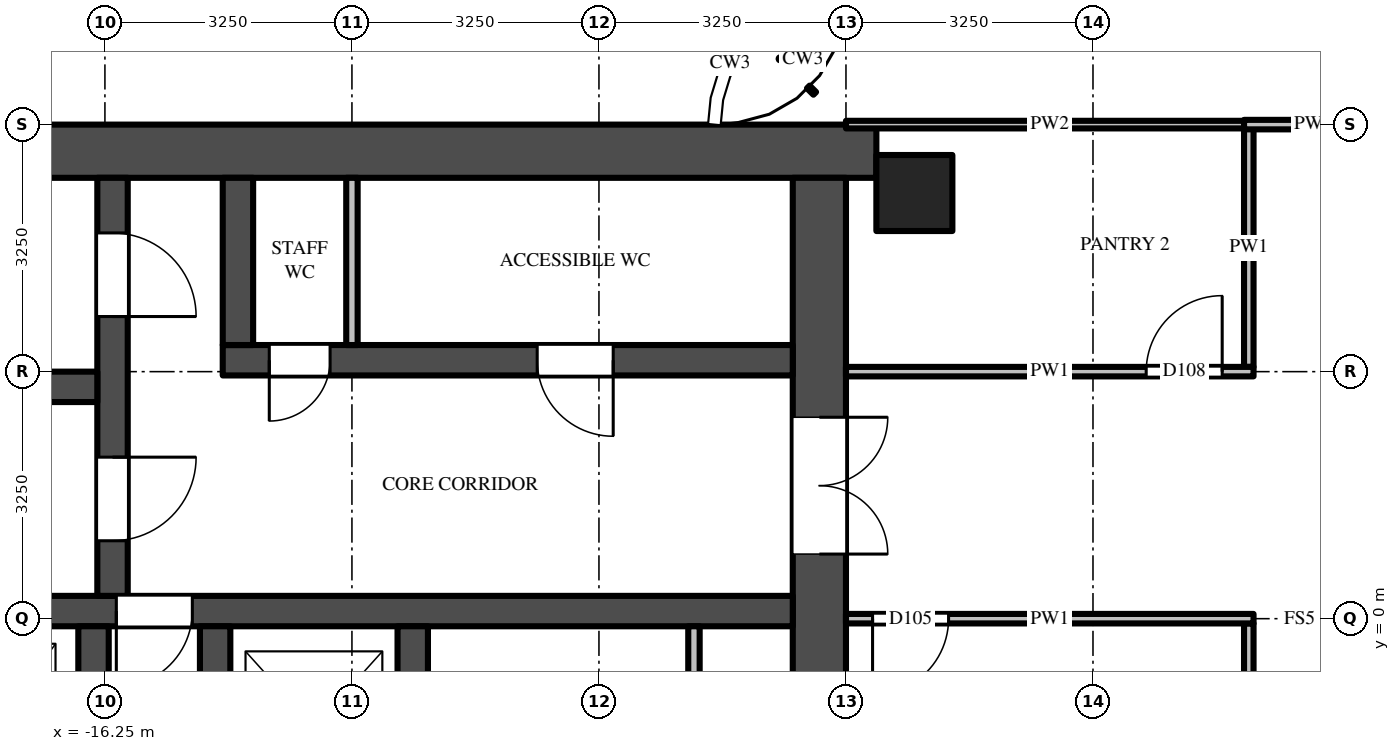
"""IFC4 building model, lengths in metres.
Left out: names, types, materials, properties, quantities, classifications, styles, units other than length and angle.
Written with IfcOpenShell. Run it as: python <this file> out.ifc"""

import sys

from ifc_helpers import new_model, si_unit, direction, frame, frame_2d, origin, origin_2d, place, context, subcontext, project, spatial, rectangle, extrude, source, transform, mapped, element, fill, save


model = new_model("IFC4")
c1 = context("Model", 3, precision=1e-05, world=origin(), true_north=direction((0.0, 1.0)))
c2 = subcontext(c1, "Body", "Model", "MODEL_VIEW")
j1 = project(units=[si_unit("LENGTHUNIT", "METRE"), si_unit("PLANEANGLEUNIT", "RADIAN")], contexts=[c1])
p1 = place(None, origin())
s1 = spatial("IfcSite", under=j1, at=p1, CompositionType="ELEMENT")
p2 = place(p1, origin())
s2 = spatial("IfcBuilding", under=s1, at=p2, CompositionType="ELEMENT")
p3 = place(p2, frame((0.0, 0.0, 287.2)))
s3 = spatial("IfcBuildingStorey", under=s2, at=p3, CompositionType="ELEMENT", Elevation=287.2)
m1 = source(origin(), c2, "Body", "SweptSolid", [
    extrude(rectangle(XDim=1.0, YDim=1.0, at=origin_2d()), origin(), (0.0, 0.0, 1.0), 3.9),
])
p4 = place(p3, frame((-5.6, 5.6, 0.0), z_axis=(0.0, 0.0, 1.0), x_axis=(1.0, 0.0, 0.0)))
e1 = element("IfcColumn", 1, at=p4, inside=s3, PredefinedType="COLUMN", context=c2, shape_type="MappedRepresentation", body=[
    mapped(m1, transform((0.0, 0.0, 0.0))),
])
m2 = source(origin(), c2, "Body", "SweptSolid", [
    extrude(rectangle(XDim=16.65, YDim=0.7, at=frame_2d((8.325, 0.0))), origin(), (0.0, 0.0, 1.0), 3.7),
])
p5 = place(p3, frame((-6.1, 6.15, 0.0), z_axis=(0.0, 0.0, 1.0), x_axis=(-1.0, 0.0, 0.0)))
e2 = element("IfcWall", 2, at=p5, inside=s3, PredefinedType="SHEAR", context=c2, shape_type="MappedRepresentation", body=[
    mapped(m2, transform((0.0, 0.0, 0.0))),
])
m3 = source(origin(), c2, "Body", "SweptSolid", [
    extrude(rectangle(XDim=9.05, YDim=0.7, at=frame_2d((4.525, 0.0))), origin(), (0.0, 0.0, 1.0), 3.7),
])
p6 = place(p3, frame((-6.85, 5.8, 0.0), z_axis=(0.0, 0.0, 1.0), x_axis=(0.0, -1.0, 0.0)))
e3 = element("IfcWall", 3, at=p6, inside=s3, PredefinedType="SHEAR", context=c2, shape_type="MappedRepresentation", body=[
    mapped(m3, transform((0.0, 0.0, 0.0))),
])
m4 = source(origin(), c2, "Body", "SweptSolid", [
    extrude(rectangle(XDim=1.8, YDim=2.1, at=frame_2d((0.9, 1.05))), frame((0.0, 0.36, 0.0), z_axis=(0.0, -1.0, 0.0), x_axis=(1.0, 0.0, 0.0)), (0.0, 0.0, 1.0), 0.72),
])
p7 = place(p6, frame((3.15, 0.0, 0.0)))
e4 = element("IfcOpeningElement", 4, at=p7, cuts=e3, PredefinedType="OPENING", context=c2, shape_type="MappedRepresentation", body=[
    mapped(m4, transform((0.0, 0.0, 0.0))),
])
m5 = source(origin(), c2, "Body", "SweptSolid", [
    extrude(rectangle(XDim=7.5, YDim=0.4, at=frame_2d((3.75, 0.0))), origin(), (0.0, 0.0, 1.0), 3.7),
])
p8 = place(p3, frame((-7.2, 3.4, 0.0), z_axis=(0.0, 0.0, 1.0), x_axis=(-1.0, 0.0, 0.0)))
e5 = element("IfcWall", 5, at=p8, inside=s3, PredefinedType="SHEAR", context=c2, shape_type="MappedRepresentation", body=[
    mapped(m5, transform((0.0, 0.0, 0.0))),
])
m6 = source(origin(), c2, "Body", "SweptSolid", [
    extrude(rectangle(XDim=1.0, YDim=2.1, at=frame_2d((0.5, 1.05))), frame((0.0, 0.21, 0.0), z_axis=(0.0, -1.0, 0.0), x_axis=(1.0, 0.0, 0.0)), (0.0, 0.0, 1.0), 0.42),
])
p9 = place(p8, frame((2.363, 0.0, 0.0)))
e6 = element("IfcOpeningElement", 6, at=p9, cuts=e5, PredefinedType="OPENING", context=c2, shape_type="MappedRepresentation", body=[
    mapped(m6, transform((0.0, 0.0, 0.0))),
])
m7 = source(origin(), c2, "Body", "SweptSolid", [
    extrude(rectangle(XDim=0.8, YDim=2.1, at=frame_2d((0.4, 1.05))), frame((0.0, 0.21, 0.0), z_axis=(0.0, -1.0, 0.0), x_axis=(1.0, 0.0, 0.0)), (0.0, 0.0, 1.0), 0.42),
])
p10 = place(p8, frame((6.087, 0.0, 0.0)))
e7 = element("IfcOpeningElement", 7, at=p10, cuts=e5, PredefinedType="OPENING", context=c2, shape_type="MappedRepresentation", body=[
    mapped(m7, transform((0.0, 0.0, 0.0))),
])
m8 = source(origin(), c2, "Body", "SweptSolid", [
    extrude(rectangle(XDim=14.85, YDim=0.4, at=frame_2d((7.425, 0.0))), origin(), (0.0, 0.0, 1.0), 3.7),
])
p11 = place(p3, frame((-7.2, 0.1, 0.0), z_axis=(0.0, 0.0, 1.0), x_axis=(-1.0, 0.0, 0.0)))
e8 = element("IfcWall", 8, at=p11, inside=s3, PredefinedType="SHEAR", context=c2, shape_type="MappedRepresentation", body=[
    mapped(m8, transform((0.0, 0.0, 0.0))),
])
p12 = place(p11, frame((7.9, 0.0, 0.0)))
e9 = element("IfcOpeningElement", 9, at=p12, cuts=e8, PredefinedType="OPENING", context=c2, shape_type="MappedRepresentation", body=[
    mapped(m6, transform((0.0, 0.0, 0.0))),
])
m9 = source(origin(), c2, "Body", "SweptSolid", [
    extrude(rectangle(XDim=5.5, YDim=0.4, at=frame_2d((2.75, 0.0))), origin(), (0.0, 0.0, 1.0), 3.7),
])
p13 = place(p3, frame((-16.15, 5.8, 0.0), z_axis=(0.0, 0.0, 1.0), x_axis=(0.0, -1.0, 0.0)))
e10 = element("IfcWall", 10, at=p13, inside=s3, PredefinedType="SHEAR", context=c2, shape_type="MappedRepresentation", body=[
    mapped(m9, transform((0.0, 0.0, 0.0))),
])
m10 = source(origin(), c2, "Body", "SweptSolid", [
    extrude(rectangle(XDim=1.1, YDim=2.1, at=frame_2d((0.55, 1.05))), frame((0.0, 0.21, 0.0), z_axis=(0.0, -1.0, 0.0), x_axis=(1.0, 0.0, 0.0)), (0.0, 0.0, 1.0), 0.42),
])
p14 = place(p13, frame((0.725, 0.0, 0.0)))
e11 = element("IfcOpeningElement", 11, at=p14, cuts=e10, PredefinedType="OPENING", context=c2, shape_type="MappedRepresentation", body=[
    mapped(m10, transform((0.0, 0.0, 0.0))),
])
p15 = place(p13, frame((3.675, 0.0, 0.0)))
e12 = element("IfcOpeningElement", 12, at=p15, cuts=e10, PredefinedType="OPENING", context=c2, shape_type="MappedRepresentation", body=[
    mapped(m10, transform((0.0, 0.0, 0.0))),
])
m11 = source(origin(), c2, "Body", "SweptSolid", [
    extrude(rectangle(XDim=5.7, YDim=0.4, at=frame_2d((2.85, 0.0))), origin(), (0.0, 0.0, 1.0), 3.7),
])
p16 = place(p3, frame((-16.35, 3.05, 0.0), z_axis=(0.0, 0.0, 1.0), x_axis=(-1.0, 0.0, 0.0)))
e13 = element("IfcWall", 13, at=p16, inside=s3, PredefinedType="SHEAR", context=c2, shape_type="MappedRepresentation", body=[
    mapped(m11, transform((0.0, 0.0, 0.0))),
])
m12 = source(origin(), c2, "Body", "SweptSolid", [
    extrude(rectangle(XDim=2.2, YDim=0.4, at=frame_2d((1.1, 0.0))), origin(), (0.0, 0.0, 1.0), 3.7),
])
p17 = place(p3, frame((-14.5, 5.8, 0.0), z_axis=(0.0, 0.0, 1.0), x_axis=(0.0, -1.0, 0.0)))
e14 = element("IfcWall", 14, at=p17, inside=s3, PredefinedType="SHEAR", context=c2, shape_type="MappedRepresentation", body=[
    mapped(m12, transform((0.0, 0.0, 0.0))),
])
m13 = source(origin(), c2, "Body", "SweptSolid", [
    extrude(rectangle(XDim=2.45, YDim=0.4, at=frame_2d((1.225, 0.0))), origin(), (0.0, 0.0, 1.0), 3.7),
])
for number, where, z_axis, x_axis in (
    (15, (-12.2, -0.1, 0.0), (0.0, 0.0, 1.0), (0.0, -1.0, 0.0)),
    (16, (-14.8, -0.1, 0.0), (0.0, 0.0, 1.0), (0.0, -1.0, 0.0)),
    (17, (-16.4, -0.1, 0.0), (0.0, 0.0, 1.0), (0.0, -1.0, 0.0)),
):
    element("IfcWall", number, at=place(p3, frame(where, z_axis=z_axis, x_axis=x_axis)), inside=s3, PredefinedType="SHEAR", context=c2, shape_type="MappedRepresentation", body=[
        mapped(m13, transform((0.0, 0.0, 0.0))),
    ])
m14 = source(origin(), c2, "Body", "SweptSolid", [
    extrude(rectangle(XDim=2.2, YDim=0.15, at=frame_2d((1.1, 0.0))), origin(), (0.0, 0.0, 1.0), 3.7),
])
p18 = place(p3, frame((-13.0, 5.8, 0.0), z_axis=(0.0, 0.0, 1.0), x_axis=(0.0, -1.0, 0.0)))
e18 = element("IfcWall", 18, at=p18, inside=s3, PredefinedType="PARTITIONING", context=c2, shape_type="MappedRepresentation", body=[
    mapped(m14, transform((0.0, 0.0, 0.0))),
])
m15 = source(origin(), c2, "Body", "SweptSolid", [
    extrude(rectangle(XDim=2.45, YDim=0.15, at=frame_2d((1.225, 0.0))), origin(), (0.0, 0.0, 1.0), 3.7),
])
p19 = place(p3, frame((-8.5, -0.1, 0.0), z_axis=(0.0, 0.0, 1.0), x_axis=(0.0, -1.0, 0.0)))
e19 = element("IfcWall", 19, at=p19, inside=s3, PredefinedType="PARTITIONING", context=c2, shape_type="MappedRepresentation", body=[
    mapped(m15, transform((0.0, 0.0, 0.0))),
])
m16 = source(origin(), c2, "Body", "SweptSolid", [
    extrude(rectangle(XDim=3.125, YDim=0.125, at=frame_2d((1.562, 0.0))), origin(), (0.0, 0.0, 1.0), 3.068),
])
p20 = place(p3, frame((-1.2, -0.062, 0.0), z_axis=(0.0, 0.0, 1.0), x_axis=(0.0, -1.0, 0.0)))
e20 = element("IfcWall", 20, at=p20, inside=s3, PredefinedType="PARTITIONING", context=c2, shape_type="MappedRepresentation", body=[
    mapped(m16, transform((0.0, 0.0, 0.0))),
])
m17 = source(origin(), c2, "Body", "SweptSolid", [
    extrude(rectangle(XDim=3.137, YDim=0.125, at=frame_2d((1.569, 0.0))), origin(), (0.0, 0.0, 1.0), 2.997),
])
p21 = place(p3, frame((-1.2, 6.45, 0.0), z_axis=(0.0, 0.0, 1.0), x_axis=(0.0, -1.0, 0.0)))
e21 = element("IfcWall", 21, at=p21, inside=s3, PredefinedType="PARTITIONING", context=c2, shape_type="MappedRepresentation", body=[
    mapped(m17, transform((0.0, 0.0, 0.0))),
])
m18 = source(origin(), c2, "Body", "SweptSolid", [
    extrude(rectangle(XDim=5.363, YDim=0.125, at=frame_2d((2.681, 0.0))), origin(), (0.0, 0.0, 1.0), 2.997),
])
p22 = place(p3, frame((-1.137, 0.0, 0.0), z_axis=(0.0, 0.0, 1.0), x_axis=(-1.0, 0.0, 0.0)))
e22 = element("IfcWall", 22, at=p22, inside=s3, PredefinedType="PARTITIONING", context=c2, shape_type="MappedRepresentation", body=[
    mapped(m18, transform((0.0, 0.0, 0.0))),
])
m19 = source(origin(), c2, "Body", "SweptSolid", [
    extrude(rectangle(XDim=1.0, YDim=2.1, at=frame_2d((0.5, 1.05))), frame((0.0, 0.073, 0.0), z_axis=(0.0, -1.0, 0.0), x_axis=(1.0, 0.0, 0.0)), (0.0, 0.0, 1.0), 0.145),
])
p23 = place(p22, frame((4.012, 0.0, 0.0)))
e23 = element("IfcOpeningElement", 23, at=p23, cuts=e22, PredefinedType="OPENING", context=c2, shape_type="MappedRepresentation", body=[
    mapped(m19, transform((0.0, 0.0, 0.0))),
])
p24 = place(p3, frame((-6.5, 3.25, 0.0), z_axis=(0.0, 0.0, 1.0), x_axis=(1.0, 0.0, 0.0)))
e24 = element("IfcWall", 24, at=p24, inside=s3, PredefinedType="PARTITIONING", context=c2, shape_type="MappedRepresentation", body=[
    mapped(m18, transform((0.0, 0.0, 0.0))),
])
p25 = place(p24, frame((3.95, 0.0, 0.0)))
e25 = element("IfcOpeningElement", 25, at=p25, cuts=e24, PredefinedType="OPENING", context=c2, shape_type="MappedRepresentation", body=[
    mapped(m19, transform((0.0, 0.0, 0.0))),
])
m20 = source(origin(), c2, "Body", "SweptSolid", [
    extrude(rectangle(XDim=5.363, YDim=0.1, at=frame_2d((2.681, 0.0))), origin(), (0.0, 0.0, 1.0), 2.78),
])
p26 = place(p3, frame((-6.5, 6.5, 0.0), z_axis=(0.0, 0.0, 1.0), x_axis=(1.0, 0.0, 0.0)))
e26 = element("IfcWall", 26, at=p26, inside=s3, PredefinedType="PARTITIONING", context=c2, shape_type="MappedRepresentation", body=[
    mapped(m20, transform((0.0, 0.0, 0.0))),
])
m21 = source(origin(), c2, "Body", "SweptSolid", [
    extrude(rectangle(XDim=1.825, YDim=0.125, at=frame_2d((0.913, 0.0))), origin(), (0.0, 0.0, 1.0), 3.7),
])
p27 = place(p3, frame((-1.262, 6.5, 0.0), z_axis=(0.0, 0.0, 1.0), x_axis=(1.0, 0.0, 0.0)))
e27 = element("IfcWall", 27, at=p27, inside=s3, PredefinedType="PARTITIONING", context=c2, shape_type="MappedRepresentation", body=[
    mapped(m21, transform((0.0, 0.0, 0.0))),
])
m22 = source(origin(), c2, "Body", "SweptSolid", [
    extrude(rectangle(XDim=1.8, YDim=2.1, at=frame_2d((0.9, 1.05))), frame((0.0, -0.275, 0.0), z_axis=(0.0, -1.0, 0.0), x_axis=(1.0, 0.0, 0.0)), (0.0, 0.0, 1.0), 0.05),
])
p28 = place(p7, origin())
e28 = element("IfcDoor", 28, at=p28, inside=s3, OperationType="DOUBLE_DOOR_SINGLE_SWING", PredefinedType="DOOR", context=c2, shape_type="MappedRepresentation", body=[
    mapped(m22, transform((0.0, 0.0, 0.0))),
])
fill(e4, e28)
m23 = source(origin(), c2, "Body", "SweptSolid", [
    extrude(rectangle(XDim=1.1, YDim=2.1, at=frame_2d((0.55, 1.05))), frame((0.0, 0.025, 0.0), z_axis=(0.0, -1.0, 0.0), x_axis=(1.0, 0.0, 0.0)), (0.0, 0.0, 1.0), 0.05),
])
p29 = place(p14, origin())
e29 = element("IfcDoor", 29, at=p29, inside=s3, OperationType="SINGLE_SWING_RIGHT", PredefinedType="DOOR", context=c2, shape_type="MappedRepresentation", body=[
    mapped(m23, transform((0.0, 0.0, 0.0))),
])
fill(e11, e29)
p30 = place(p15, origin())
e30 = element("IfcDoor", 30, at=p30, inside=s3, OperationType="SINGLE_SWING_LEFT", PredefinedType="DOOR", context=c2, shape_type="MappedRepresentation", body=[
    mapped(m23, transform((0.0, 0.0, 0.0))),
])
fill(e12, e30)
m24 = source(origin(), c2, "Body", "SweptSolid", [
    extrude(rectangle(XDim=1.0, YDim=2.1, at=frame_2d((0.5, 1.05))), frame((0.0, 0.025, 0.0), z_axis=(0.0, -1.0, 0.0), x_axis=(1.0, 0.0, 0.0)), (0.0, 0.0, 1.0), 0.05),
])
p31 = place(p12, origin())
e31 = element("IfcDoor", 31, at=p31, inside=s3, OperationType="SINGLE_SWING_RIGHT", PredefinedType="DOOR", context=c2, shape_type="MappedRepresentation", body=[
    mapped(m24, transform((0.0, 0.0, 0.0))),
])
fill(e9, e31)
p32 = place(p9, origin())
e32 = element("IfcDoor", 32, at=p32, inside=s3, OperationType="SINGLE_SWING_LEFT", PredefinedType="DOOR", context=c2, shape_type="MappedRepresentation", body=[
    mapped(m24, transform((0.0, 0.0, 0.0))),
])
fill(e6, e32)
m25 = source(origin(), c2, "Body", "SweptSolid", [
    extrude(rectangle(XDim=0.8, YDim=2.1, at=frame_2d((0.4, 1.05))), frame((0.0, 0.025, 0.0), z_axis=(0.0, -1.0, 0.0), x_axis=(1.0, 0.0, 0.0)), (0.0, 0.0, 1.0), 0.05),
])
p33 = place(p10, origin())
e33 = element("IfcDoor", 33, at=p33, inside=s3, OperationType="SINGLE_SWING_RIGHT", PredefinedType="DOOR", context=c2, shape_type="MappedRepresentation", body=[
    mapped(m25, transform((0.0, 0.0, 0.0))),
])
fill(e7, e33)
p34 = place(p23, origin())
e34 = element("IfcDoor", 34, at=p34, inside=s3, OperationType="SINGLE_SWING_RIGHT", PredefinedType="DOOR", context=c2, shape_type="MappedRepresentation", body=[
    mapped(m24, transform((0.0, 0.0, 0.0))),
])
fill(e23, e34)
p35 = place(p25, origin())
e35 = element("IfcDoor", 35, at=p35, inside=s3, OperationType="SINGLE_SWING_RIGHT", PredefinedType="DOOR", context=c2, shape_type="MappedRepresentation", body=[
    mapped(m24, transform((0.0, 0.0, 0.0))),
])
fill(e25, e35)
save(model, sys.argv[1])
